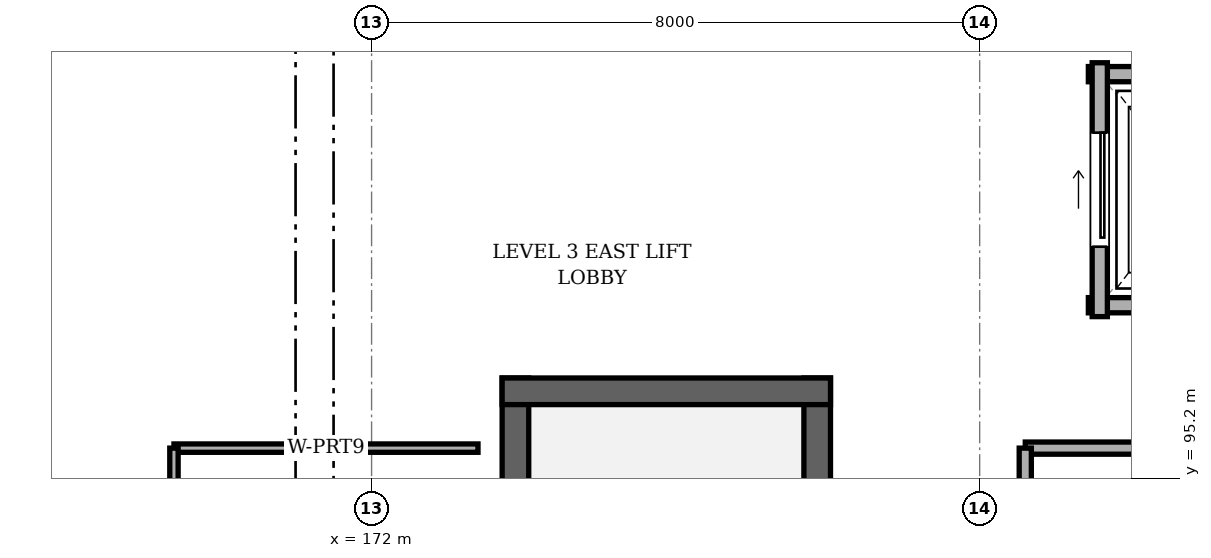
"""IFC4 building model, lengths in metres.
Left out: names, types, materials, properties, quantities, classifications, styles, units other than length and angle.
Written with IfcOpenShell. Run it as: python <this file> out.ifc"""

import sys

from ifc_helpers import new_model, si_unit, direction, frame, frame_2d, origin, place, context, subcontext, project, spatial, rectangle, extrude, element, fill, save


model = new_model("IFC4")
c1 = context("Model", 3, precision=1e-05, world=origin(), true_north=direction((0.0, 1.0)))
c2 = subcontext(c1, "Body", "Model", "MODEL_VIEW")
j1 = project(units=[si_unit("LENGTHUNIT", "METRE"), si_unit("PLANEANGLEUNIT", "RADIAN")], contexts=[c1])
p1 = place(None, origin())
s1 = spatial("IfcSite", under=j1, at=p1, CompositionType="ELEMENT")
p2 = place(p1, origin())
s2 = spatial("IfcBuilding", under=s1, at=p2, CompositionType="ELEMENT")
p3 = place(p2, frame((0.0, 0.0, 14.4)))
s3 = spatial("IfcBuildingStorey", under=s2, at=p3, CompositionType="ELEMENT", Elevation=14.4)
for number, where, z_axis, x_axis in (
    (1, (177.863, 86.025, 0.0), (0.0, 0.0, 1.0), (0.0, 1.0, 0.0)),
    (2, (173.893, 96.522, 0.0), (0.0, 0.0, 1.0), (0.0, -1.0, 0.0)),
):
    element("IfcWall", number, at=place(p3, frame(where, z_axis=z_axis, x_axis=x_axis)), inside=s3, PredefinedType="SHEAR", context=c2, shape_type="SweptSolid", body=[
        extrude(rectangle(XDim=10.498, YDim=0.35, at=frame_2d((5.249, 0.0))), origin(), (0.0, 0.0, 1.0), 3.0),
    ])
p4 = place(p3, frame((178.038, 96.347, 0.0), z_axis=(0.0, 0.0, 1.0), x_axis=(-1.0, 0.0, 0.0)))
e3 = element("IfcWall", 3, at=p4, inside=s3, PredefinedType="SHEAR", context=c2, shape_type="SweptSolid", body=[
    extrude(rectangle(XDim=4.32, YDim=0.35, at=frame_2d((2.16, 0.0))), origin(), (0.0, 0.0, 1.0), 3.0),
])
for number, where, z_axis, x_axis in (
    (4, (181.43, 97.48, 0.0), (0.0, 0.0, 1.0), (1.0, 0.0, 0.0)),
    (5, (184.17, 100.52, 0.0), (0.0, 0.0, 1.0), (-1.0, 0.0, 0.0)),
):
    element("IfcWall", number, at=place(p3, frame(where, z_axis=z_axis, x_axis=x_axis)), inside=s3, PredefinedType="SOLIDWALL", context=c2, shape_type="SweptSolid", body=[
        extrude(rectangle(XDim=2.74, YDim=0.2, at=frame_2d((1.37, 0.0))), origin(), (0.0, 0.0, 1.0), 2.975),
    ])
p5 = place(p3, frame((181.58, 100.67, 0.0), z_axis=(0.0, 0.0, 1.0), x_axis=(0.0, -1.0, 0.0)))
e6 = element("IfcWall", 6, at=p5, inside=s3, PredefinedType="SOLIDWALL", context=c2, shape_type="SweptSolid", body=[
    extrude(rectangle(XDim=3.34, YDim=0.2, at=frame_2d((1.67, 0.0))), origin(), (0.0, 0.0, 1.0), 2.975),
])
p6 = place(p5, frame((0.92, 0.0, 0.0)))
e7 = element("IfcOpeningElement", 7, at=p6, cuts=e6, PredefinedType="OPENING", context=c2, shape_type="SweptSolid", body=[
    extrude(rectangle(XDim=1.5, YDim=2.2, at=frame_2d((0.75, 1.1))), frame((0.0, 0.11, 0.0), z_axis=(0.0, -1.0, 0.0), x_axis=(1.0, 0.0, 0.0)), (0.0, 0.0, 1.0), 0.22),
])
p7 = place(p3, frame((169.4, 95.6, 0.0), z_axis=(0.0, 0.0, 1.0), x_axis=(1.0, 0.0, 0.0)))
e8 = element("IfcWall", 8, at=p7, inside=s3, PredefinedType="PARTITIONING", context=c2, shape_type="SweptSolid", body=[
    extrude(rectangle(XDim=4.0, YDim=0.11, at=frame_2d((2.0, 0.0))), origin(), (0.0, 0.0, 1.0), 2.585),
])
p8 = place(p3, frame((169.4, 84.4, 0.0), z_axis=(0.0, 0.0, 1.0), x_axis=(0.0, 1.0, 0.0)))
e9 = element("IfcWall", 9, at=p8, inside=s3, PredefinedType="PARTITIONING", context=c2, shape_type="SweptSolid", body=[
    extrude(rectangle(XDim=11.2, YDim=0.11, at=frame_2d((5.6, 0.0))), origin(), (0.0, 0.0, 1.0), 2.535),
])
p9 = place(p8, frame((5.075, 0.0, 0.0)))
e10 = element("IfcOpeningElement", 10, at=p9, cuts=e9, PredefinedType="OPENING", context=c2, shape_type="SweptSolid", body=[
    extrude(rectangle(XDim=1.05, YDim=2.1, at=frame_2d((0.525, 1.05))), frame((0.0, 0.065, 0.0), z_axis=(0.0, -1.0, 0.0), x_axis=(1.0, 0.0, 0.0)), (0.0, 0.0, 1.0), 0.13),
])
p10 = place(p3, frame((180.6, 95.6, 0.0), z_axis=(0.0, 0.0, 1.0), x_axis=(1.0, 0.0, 0.0)))
e11 = element("IfcWall", 11, at=p10, inside=s3, PredefinedType="PARTITIONING", context=c2, shape_type="SweptSolid", body=[
    extrude(rectangle(XDim=6.6, YDim=0.16, at=frame_2d((3.3, 0.0))), origin(), (0.0, 0.0, 1.0), 2.515),
])
p11 = place(p10, frame((2.775, 0.0, 0.0)))
e12 = element("IfcOpeningElement", 12, at=p11, cuts=e11, PredefinedType="OPENING", context=c2, shape_type="SweptSolid", body=[
    extrude(rectangle(XDim=1.05, YDim=2.1, at=frame_2d((0.525, 1.05))), frame((0.0, 0.09, 0.0), z_axis=(0.0, -1.0, 0.0), x_axis=(1.0, 0.0, 0.0)), (0.0, 0.0, 1.0), 0.18),
])
p12 = place(p3, frame((180.6, 86.4, 0.0), z_axis=(0.0, 0.0, 1.0), x_axis=(0.0, 1.0, 0.0)))
e13 = element("IfcWall", 13, at=p12, inside=s3, PredefinedType="PARTITIONING", context=c2, shape_type="SweptSolid", body=[
    extrude(rectangle(XDim=9.2, YDim=0.16, at=frame_2d((4.6, 0.0))), origin(), (0.0, 0.0, 1.0), 2.535),
])
p13 = place(p6, origin())
e14 = element("IfcDoor", 14, at=p13, inside=s3, OperationType="SLIDING_TO_LEFT", PredefinedType="DOOR", context=c2, shape_type="SweptSolid", body=[
    extrude(rectangle(XDim=1.5, YDim=2.2, at=frame_2d((0.75, 1.1))), frame((0.0, 0.025, 0.0), z_axis=(0.0, -1.0, 0.0), x_axis=(1.0, 0.0, 0.0)), (0.0, 0.0, 1.0), 0.05),
])
fill(e7, e14)
save(model, sys.argv[1])
